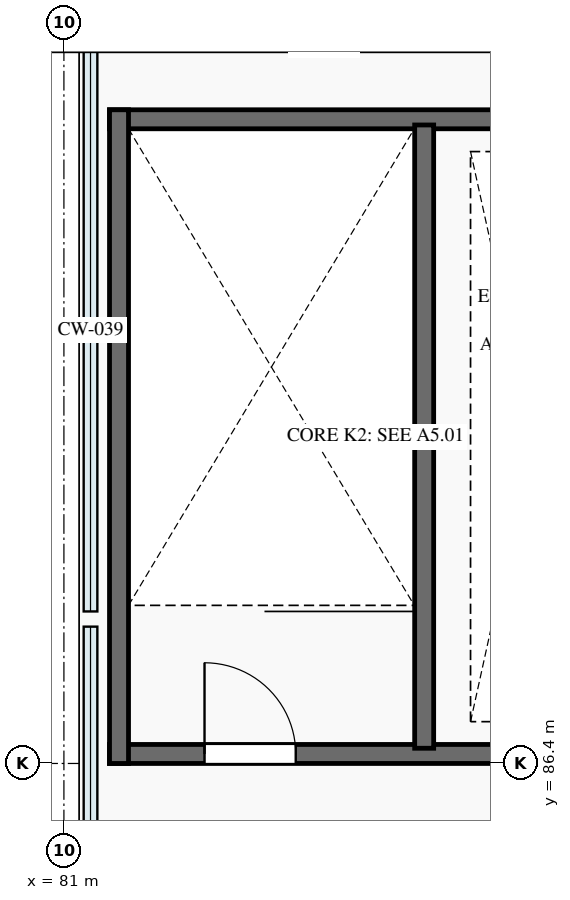
"""IFC4 building model, lengths in metres.
Left out: names, types, materials, properties, quantities, classifications, styles, units other than length and angle.
Written with IfcOpenShell. Run it as: python <this file> out.ifc"""

import sys

from ifc_helpers import new_model, si_unit, direction, frame, frame_2d, origin, place, context, subcontext, project, spatial, rectangle, extrude, element, fill, save


model = new_model("IFC4")
c1 = context("Model", 3, precision=1e-05, world=origin(), true_north=direction((0.0, 1.0)))
c2 = subcontext(c1, "Body", "Model", "MODEL_VIEW")
j1 = project(units=[si_unit("LENGTHUNIT", "METRE"), si_unit("PLANEANGLEUNIT", "RADIAN")], contexts=[c1])
p1 = place(None, origin())
s1 = spatial("IfcSite", under=j1, at=p1, CompositionType="ELEMENT")
p2 = place(p1, origin())
s2 = spatial("IfcBuilding", under=s1, at=p2, CompositionType="ELEMENT")
p3 = place(p2, frame((0.0, 0.0, 15.0)))
s3 = spatial("IfcBuildingStorey", under=s2, at=p3, CompositionType="ELEMENT", Elevation=15.0)
p4 = place(p3, frame((81.6, 86.525, 0.0), z_axis=(0.0, 0.0, 1.0), x_axis=(1.0, 0.0, 0.0)))
e1 = element("IfcWall", 1, at=p4, inside=s3, PredefinedType="SHEAR", context=c2, shape_type="SweptSolid", body=[
    extrude(rectangle(XDim=7.0, YDim=0.25, at=frame_2d((3.5, 0.0))), origin(), (0.0, 0.0, 1.0), 3.9),
])
p5 = place(p4, frame((1.25, 0.0, 0.0)))
e2 = element("IfcOpeningElement", 2, at=p5, cuts=e1, PredefinedType="OPENING", context=c2, shape_type="SweptSolid", body=[
    extrude(rectangle(XDim=1.2, YDim=2.15, at=frame_2d((0.6, 1.075))), frame((0.0, 0.14, 0.0), z_axis=(0.0, -1.0, 0.0), x_axis=(1.0, 0.0, 0.0)), (0.0, 0.0, 1.0), 0.28),
])
p6 = place(p3, frame((81.6, 94.875, 0.0), z_axis=(0.0, 0.0, 1.0), x_axis=(1.0, 0.0, 0.0)))
e3 = element("IfcWall", 3, at=p6, inside=s3, PredefinedType="SHEAR", context=c2, shape_type="SweptSolid", body=[
    extrude(rectangle(XDim=7.0, YDim=0.25, at=frame_2d((3.5, 0.0))), origin(), (0.0, 0.0, 1.0), 3.9),
])
p7 = place(p3, frame((81.725, 86.4, 0.0), z_axis=(0.0, 0.0, 1.0), x_axis=(0.0, 1.0, 0.0)))
e4 = element("IfcWall", 4, at=p7, inside=s3, PredefinedType="SHEAR", context=c2, shape_type="SweptSolid", body=[
    extrude(rectangle(XDim=8.6, YDim=0.25, at=frame_2d((4.3, 0.0))), origin(), (0.0, 0.0, 1.0), 3.9),
])
p8 = place(p3, frame((85.74, 86.6, 0.0), z_axis=(0.0, 0.0, 1.0), x_axis=(0.0, 1.0, 0.0)))
e5 = element("IfcWall", 5, at=p8, inside=s3, PredefinedType="SHEAR", context=c2, shape_type="SweptSolid", body=[
    extrude(rectangle(XDim=8.2, YDim=0.25, at=frame_2d((4.1, 0.0))), origin(), (0.0, 0.0, 1.0), 3.9),
])
p9 = place(p5, origin())
e6 = element("IfcDoor", 6, at=p9, inside=s3, OperationType="SINGLE_SWING_LEFT", PredefinedType="DOOR", context=c2, shape_type="SweptSolid", body=[
    extrude(rectangle(XDim=1.2, YDim=2.15, at=frame_2d((0.6, 1.075))), frame((0.0, 0.025, 0.0), z_axis=(0.0, -1.0, 0.0), x_axis=(1.0, 0.0, 0.0)), (0.0, 0.0, 1.0), 0.05),
])
fill(e2, e6)
save(model, sys.argv[1])
